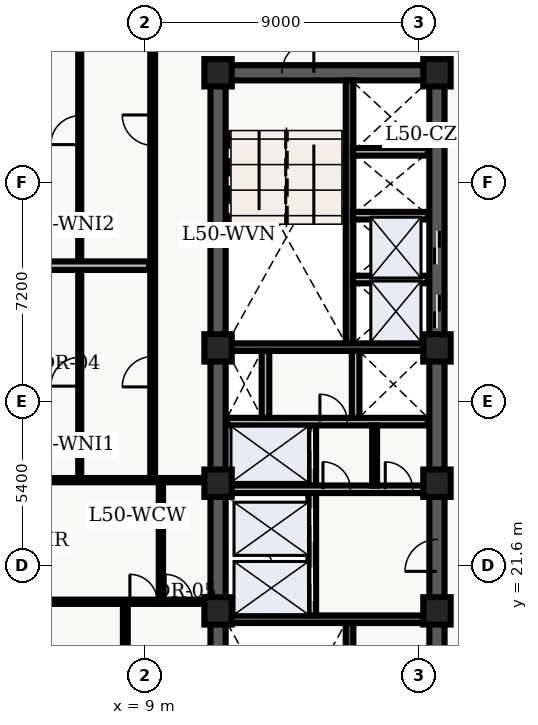
"""IFC4 building model, lengths in metres.
Left out: names, types, materials, properties, quantities, classifications, styles, units other than length and angle.
Written with IfcOpenShell. Run it as: python <this file> out.ifc"""

import sys

from ifc_helpers import new_model, entity, si_unit, converted_unit, direction, frame, origin_with_axes, origin_2d_with_axis, place, context, subcontext, project, spatial, polyline, rectangle, outline, extrude, element, fill, save


model = new_model("IFC4")
c1 = context("Model", 3, precision=1e-05, world=origin_with_axes(), true_north=direction((0.0, 1.0)))
c2 = subcontext(c1, "Body", "Model", "MODEL_VIEW")
j1 = project(units=[si_unit("LENGTHUNIT", "METRE"), converted_unit("PLANEANGLEUNIT", "DEGREE", entity("IfcPlaneAngleMeasure", 0.017), si_unit("PLANEANGLEUNIT", "RADIAN"), dimensions=[0, 0, 0, 0, 0, 0, 0])], contexts=[c1])
p1 = place(None, origin_with_axes())
s1 = spatial("IfcSite", under=j1, at=p1, CompositionType="ELEMENT")
p2 = place(p1, origin_with_axes())
s2 = spatial("IfcBuilding", under=s1, at=p2, CompositionType="ELEMENT")
p3 = place(p2, frame((0.0, 0.0, 204.3), z_axis=(0.0, 0.0, 1.0), x_axis=(1.0, 0.0, 0.0)))
s3 = spatial("IfcBuildingStorey", under=s2, at=p3, CompositionType="ELEMENT", Elevation=204.3)
p4 = place(p3, frame((11.4, 10.8, 0.0), z_axis=(0.0, 0.0, 1.0), x_axis=(0.0, 1.0, 0.0)))
e1 = element("IfcWall", 1, at=p4, inside=s3, PredefinedType="SHEAR", context=c2, shape_type="SweptSolid", body=[
    extrude(outline(polyline([(0.0, -0.25), (27.0, -0.25), (27.0, 0.25), (0.0, 0.25), (0.0, -0.25)])), origin_with_axes(), (0.0, 0.0, 1.0), 3.66),
])
p5 = place(p3, frame((11.4, 37.8, 0.0), z_axis=(0.0, 0.0, 1.0), x_axis=(1.0, 0.0, 0.0)))
e2 = element("IfcWall", 2, at=p5, inside=s3, PredefinedType="SHEAR", context=c2, shape_type="SweptSolid", body=[
    extrude(outline(polyline([(0.0, -0.25), (7.2, -0.25), (7.2, 0.25), (0.0, 0.25), (0.0, -0.25)])), origin_with_axes(), (0.0, 0.0, 1.0), 3.66),
])
p6 = place(p5, frame((2.625, 0.0, 0.0), z_axis=(0.0, 0.0, 1.0), x_axis=(1.0, 0.0, 0.0)))
e3 = element("IfcOpeningElement", 3, at=p6, cuts=e2, PredefinedType="OPENING", context=c2, shape_type="SweptSolid", body=[
    extrude(rectangle(XDim=1.05, YDim=0.52, at=origin_2d_with_axis()), origin_with_axes(), (0.0, 0.0, 1.0), 2.15),
])
p7 = place(p3, frame((18.6, 10.8, 0.0), z_axis=(0.0, 0.0, 1.0), x_axis=(0.0, 1.0, 0.0)))
e4 = element("IfcWall", 4, at=p7, inside=s3, PredefinedType="SHEAR", context=c2, shape_type="SweptSolid", body=[
    extrude(outline(polyline([(0.0, -0.25), (13.5, -0.25), (13.5, 0.25), (0.0, 0.25), (0.0, -0.25)])), origin_with_axes(), (0.0, 0.0, 1.0), 3.66),
])
p8 = place(p7, frame((11.125, 0.0, 0.0), z_axis=(0.0, 0.0, 1.0), x_axis=(1.0, 0.0, 0.0)))
e5 = element("IfcOpeningElement", 5, at=p8, cuts=e4, PredefinedType="OPENING", context=c2, shape_type="SweptSolid", body=[
    extrude(rectangle(XDim=1.05, YDim=0.52, at=origin_2d_with_axis()), origin_with_axes(), (0.0, 0.0, 1.0), 2.15),
])
p9 = place(p7, frame((2.425, 0.0, 0.0), z_axis=(0.0, 0.0, 1.0), x_axis=(1.0, 0.0, 0.0)))
e6 = element("IfcOpeningElement", 6, at=p9, cuts=e4, PredefinedType="OPENING", context=c2, shape_type="SweptSolid", body=[
    extrude(rectangle(XDim=1.05, YDim=0.52, at=origin_2d_with_axis()), origin_with_axes(), (0.0, 0.0, 1.0), 2.15),
])
p10 = place(p7, frame((6.725, 0.0, 0.0), z_axis=(0.0, 0.0, 1.0), x_axis=(1.0, 0.0, 0.0)))
e7 = element("IfcOpeningElement", 7, at=p10, cuts=e4, PredefinedType="OPENING", context=c2, shape_type="SweptSolid", body=[
    extrude(rectangle(XDim=1.05, YDim=0.52, at=origin_2d_with_axis()), origin_with_axes(), (0.0, 0.0, 1.0), 2.15),
])
p11 = place(p3, frame((18.6, 24.3, 0.0), z_axis=(0.0, 0.0, 1.0), x_axis=(0.0, 1.0, 0.0)))
e8 = element("IfcWall", 8, at=p11, inside=s3, PredefinedType="SHEAR", context=c2, shape_type="SweptSolid", body=[
    extrude(outline(polyline([(0.0, -0.25), (13.5, -0.25), (13.5, 0.25), (0.0, 0.25), (0.0, -0.25)])), origin_with_axes(), (0.0, 0.0, 1.0), 3.66),
])
p12 = place(p11, frame((5.65, 0.0, 0.0), z_axis=(0.0, 0.0, 1.0), x_axis=(1.0, 0.0, 0.0)))
e9 = element("IfcOpeningElement", 9, at=p12, cuts=e8, PredefinedType="OPENING", context=c2, shape_type="SweptSolid", body=[
    extrude(rectangle(XDim=1.1, YDim=0.52, at=origin_2d_with_axis()), origin_with_axes(), (0.0, 0.0, 1.0), 2.15),
])
p13 = place(p11, frame((7.75, 0.0, 0.0), z_axis=(0.0, 0.0, 1.0), x_axis=(1.0, 0.0, 0.0)))
e10 = element("IfcOpeningElement", 10, at=p13, cuts=e8, PredefinedType="OPENING", context=c2, shape_type="SweptSolid", body=[
    extrude(rectangle(XDim=1.1, YDim=0.52, at=origin_2d_with_axis()), origin_with_axes(), (0.0, 0.0, 1.0), 2.15),
])
p14 = place(p3, frame((15.725, 11.05, 0.0), z_axis=(0.0, 0.0, 1.0), x_axis=(0.0, 1.0, 0.0)))
e11 = element("IfcWall", 11, at=p14, inside=s3, PredefinedType="SHEAR", context=c2, shape_type="SweptSolid", body=[
    extrude(outline(polyline([(0.0, -0.125), (8.65, -0.125), (8.65, 0.125), (0.0, 0.125), (0.0, -0.125)])), origin_with_axes(), (0.0, 0.0, 1.0), 3.66),
])
p15 = place(p3, frame((11.65, 19.825, 0.0), z_axis=(0.0, 0.0, 1.0), x_axis=(1.0, 0.0, 0.0)))
e12 = element("IfcWall", 12, at=p15, inside=s3, PredefinedType="SHEAR", context=c2, shape_type="SweptSolid", body=[
    extrude(outline(polyline([(0.0, -0.125), (6.7, -0.125), (6.7, 0.125), (0.0, 0.125), (0.0, -0.125)])), origin_with_axes(), (0.0, 0.0, 1.0), 3.66),
])
p16 = place(p3, frame((15.725, 28.9, 0.0), z_axis=(0.0, 0.0, 1.0), x_axis=(0.0, 1.0, 0.0)))
e13 = element("IfcWall", 13, at=p16, inside=s3, PredefinedType="SHEAR", context=c2, shape_type="SweptSolid", body=[
    extrude(outline(polyline([(0.0, -0.125), (8.65, -0.125), (8.65, 0.125), (0.0, 0.125), (0.0, -0.125)])), origin_with_axes(), (0.0, 0.0, 1.0), 3.66),
])
p17 = place(p3, frame((11.65, 28.775, 0.0), z_axis=(0.0, 0.0, 1.0), x_axis=(1.0, 0.0, 0.0)))
e14 = element("IfcWall", 14, at=p17, inside=s3, PredefinedType="SHEAR", context=c2, shape_type="SweptSolid", body=[
    extrude(outline(polyline([(0.0, -0.125), (6.7, -0.125), (6.7, 0.125), (0.0, 0.125), (0.0, -0.125)])), origin_with_axes(), (0.0, 0.0, 1.0), 3.66),
])
p18 = place(p3, frame((14.5, 19.95, 0.0), z_axis=(0.0, 0.0, 1.0), x_axis=(0.0, 1.0, 0.0)))
e15 = element("IfcWall", 15, at=p18, inside=s3, PredefinedType="SOLIDWALL", context=c2, shape_type="SweptSolid", body=[
    extrude(outline(polyline([(0.0, -0.125), (6.25, -0.125), (6.25, 0.125), (0.0, 0.125), (0.0, -0.125)])), origin_with_axes(), (0.0, 0.0, 1.0), 2.7),
])
p19 = place(p18, frame((1.025, 0.0, 0.0), z_axis=(0.0, 0.0, 1.0), x_axis=(1.0, 0.0, 0.0)))
e16 = element("IfcOpeningElement", 16, at=p19, cuts=e15, PredefinedType="OPENING", context=c2, shape_type="SweptSolid", body=[
    extrude(rectangle(XDim=1.1, YDim=0.27, at=origin_2d_with_axis()), origin_with_axes(), (0.0, 0.0, 1.0), 2.15),
])
p20 = place(p18, frame((2.975, 0.0, 0.0), z_axis=(0.0, 0.0, 1.0), x_axis=(1.0, 0.0, 0.0)))
e17 = element("IfcOpeningElement", 17, at=p20, cuts=e15, PredefinedType="OPENING", context=c2, shape_type="SweptSolid", body=[
    extrude(rectangle(XDim=1.1, YDim=0.27, at=origin_2d_with_axis()), origin_with_axes(), (0.0, 0.0, 1.0), 2.15),
])
p21 = place(p18, frame((5.425, 0.0, 0.0), z_axis=(0.0, 0.0, 1.0), x_axis=(1.0, 0.0, 0.0)))
e18 = element("IfcOpeningElement", 18, at=p21, cuts=e15, PredefinedType="OPENING", context=c2, shape_type="SweptSolid", body=[
    extrude(rectangle(XDim=1.2, YDim=0.27, at=origin_2d_with_axis()), origin_with_axes(), (0.0, 0.0, 1.0), 2.15),
])
p22 = place(p3, frame((11.7, 24.1, 0.0), z_axis=(0.0, 0.0, 1.0), x_axis=(1.0, 0.0, 0.0)))
e19 = element("IfcWall", 19, at=p22, inside=s3, PredefinedType="SOLIDWALL", context=c2, shape_type="SweptSolid", body=[
    extrude(outline(polyline([(0.0, -0.125), (6.6, -0.125), (6.6, 0.125), (0.0, 0.125), (0.0, -0.125)])), origin_with_axes(), (0.0, 0.0, 1.0), 2.7),
])
p23 = place(p22, frame((3.6, 0.0, 0.0), z_axis=(0.0, 0.0, 1.0), x_axis=(1.0, 0.0, 0.0)))
e20 = element("IfcOpeningElement", 20, at=p23, cuts=e19, PredefinedType="OPENING", context=c2, shape_type="SweptSolid", body=[
    extrude(rectangle(XDim=0.9, YDim=0.27, at=origin_2d_with_axis()), origin_with_axes(), (0.0, 0.0, 1.0), 2.15),
])
p24 = place(p22, frame((5.65, 0.0, 0.0), z_axis=(0.0, 0.0, 1.0), x_axis=(1.0, 0.0, 0.0)))
e21 = element("IfcOpeningElement", 21, at=p24, cuts=e19, PredefinedType="OPENING", context=c2, shape_type="SweptSolid", body=[
    extrude(rectangle(XDim=0.9, YDim=0.27, at=origin_2d_with_axis()), origin_with_axes(), (0.0, 0.0, 1.0), 2.15),
])
p25 = place(p3, frame((11.7, 26.325, 0.0), z_axis=(0.0, 0.0, 1.0), x_axis=(1.0, 0.0, 0.0)))
e22 = element("IfcWall", 22, at=p25, inside=s3, PredefinedType="SOLIDWALL", context=c2, shape_type="SweptSolid", body=[
    extrude(outline(polyline([(0.0, -0.125), (6.6, -0.125), (6.6, 0.125), (0.0, 0.125), (0.0, -0.125)])), origin_with_axes(), (0.0, 0.0, 1.0), 2.7),
])
p26 = place(p25, frame((3.5, 0.0, 0.0), z_axis=(0.0, 0.0, 1.0), x_axis=(1.0, 0.0, 0.0)))
e23 = element("IfcOpeningElement", 23, at=p26, cuts=e22, PredefinedType="OPENING", context=c2, shape_type="SweptSolid", body=[
    extrude(rectangle(XDim=0.9, YDim=0.27, at=origin_2d_with_axis()), origin_with_axes(), (0.0, 0.0, 1.0), 2.15),
])
for number, where, z_axis, x_axis in (
    (24, (12.96, 26.45, 0.0), (0.0, 0.0, 1.0), (0.0, 1.0, 0.0)),
    (25, (15.925, 26.45, 0.0), (0.0, 0.0, 1.0), (0.0, 1.0, 0.0)),
):
    element("IfcWall", number, at=place(p3, frame(where, z_axis=z_axis, x_axis=x_axis)), inside=s3, PredefinedType="SOLIDWALL", context=c2, shape_type="SweptSolid", body=[
        extrude(outline(polyline([(0.0, -0.125), (2.2, -0.125), (2.2, 0.125), (0.0, 0.125), (0.0, -0.125)])), origin_with_axes(), (0.0, 0.0, 1.0), 2.7),
    ])
for number, where, z_axis, x_axis in (
    (26, (11.4, 20.1, 0.0), (0.0, 0.0, 1.0), (1.0, 0.0, 0.0)),
    (27, (11.4, 24.3, 0.0), (0.0, 0.0, 1.0), (1.0, 0.0, 0.0)),
    (28, (11.4, 28.75, 0.0), (0.0, 0.0, 1.0), (1.0, 0.0, 0.0)),
    (29, (11.4, 37.8, 0.0), (0.0, 0.0, 1.0), (1.0, 0.0, 0.0)),
    (30, (18.6, 20.1, 0.0), (0.0, 0.0, 1.0), (1.0, 0.0, 0.0)),
    (31, (18.6, 24.3, 0.0), (0.0, 0.0, 1.0), (1.0, 0.0, 0.0)),
    (32, (18.6, 28.75, 0.0), (0.0, 0.0, 1.0), (1.0, 0.0, 0.0)),
    (33, (18.6, 37.8, 0.0), (0.0, 0.0, 1.0), (1.0, 0.0, 0.0)),
):
    element("IfcColumn", number, at=place(p3, frame(where, z_axis=z_axis, x_axis=x_axis)), inside=s3, PredefinedType="COLUMN", context=c2, shape_type="SweptSolid", body=[
        extrude(rectangle(XDim=0.9, YDim=0.9, at=origin_2d_with_axis()), origin_with_axes(), (0.0, 0.0, 1.0), 3.9),
    ])
p27 = place(p3, frame((16.55, 24.22, 0.0), z_axis=(0.0, 0.0, 1.0), x_axis=(0.0, 1.0, 0.0)))
e34 = element("IfcWall", 34, at=p27, inside=s3, PredefinedType="PARTITIONING", context=c2, shape_type="SweptSolid", body=[
    extrude(outline(polyline([(0.0, -0.08), (1.98, -0.08), (1.98, 0.08), (0.0, 0.08), (0.0, -0.08)])), origin_with_axes(), (0.0, 0.0, 1.0), 2.7),
])
for number, where, z_axis, x_axis in (
    (35, (15.84, 31.0, 0.0), (0.0, 0.0, 1.0), (1.0, 0.0, 0.0)),
    (36, (15.84, 33.1, 0.0), (0.0, 0.0, 1.0), (1.0, 0.0, 0.0)),
    (37, (15.84, 35.2, 0.0), (0.0, 0.0, 1.0), (1.0, 0.0, 0.0)),
):
    element("IfcWall", number, at=place(p3, frame(where, z_axis=z_axis, x_axis=x_axis)), inside=s3, PredefinedType="SOLIDWALL", context=c2, shape_type="SweptSolid", body=[
        extrude(outline(polyline([(0.0, -0.125), (2.46, -0.125), (2.46, 0.125), (0.0, 0.125), (0.0, -0.125)])), origin_with_axes(), (0.0, 0.0, 1.0), 2.7),
    ])
p28 = place(p3, frame((9.52, 20.4, 0.0), z_axis=(0.0, 0.0, 1.0), x_axis=(0.0, 1.0, 0.0)))
e38 = element("IfcWall", 38, at=p28, inside=s3, PredefinedType="PARTITIONING", context=c2, shape_type="SweptSolid", body=[
    extrude(outline(polyline([(0.0, -0.07), (4.0, -0.07), (4.0, 0.07), (0.0, 0.07), (0.0, -0.07)])), origin_with_axes(), (0.0, 0.0, 1.0), 2.7),
])
p29 = place(p3, frame((9.52, 20.4, 0.0), z_axis=(0.0, 0.0, 1.0), x_axis=(1.0, 0.0, 0.0)))
e39 = element("IfcWall", 39, at=p29, inside=s3, PredefinedType="PARTITIONING", context=c2, shape_type="SweptSolid", body=[
    extrude(outline(polyline([(0.0, -0.07), (1.58, -0.07), (1.58, 0.07), (0.0, 0.07), (0.0, -0.07)])), origin_with_axes(), (0.0, 0.0, 1.0), 2.7),
])
p30 = place(p29, frame((0.59, 0.0, 0.0), z_axis=(0.0, 0.0, 1.0), x_axis=(1.0, 0.0, 0.0)))
e40 = element("IfcOpeningElement", 40, at=p30, cuts=e39, PredefinedType="OPENING", context=c2, shape_type="SweptSolid", body=[
    extrude(rectangle(XDim=0.9, YDim=0.16, at=origin_2d_with_axis()), origin_with_axes(), (0.0, 0.0, 1.0), 2.15),
])
p31 = place(p3, frame((9.52, 24.4, 0.0), z_axis=(0.0, 0.0, 1.0), x_axis=(1.0, 0.0, 0.0)))
e41 = element("IfcWall", 41, at=p31, inside=s3, PredefinedType="PARTITIONING", context=c2, shape_type="SweptSolid", body=[
    extrude(outline(polyline([(0.0, -0.07), (1.58, -0.07), (1.58, 0.07), (0.0, 0.07), (0.0, -0.07)])), origin_with_axes(), (0.0, 0.0, 1.0), 2.7),
])
p32 = place(p3, frame((8.35, 7.8, 0.0), z_axis=(0.0, 0.0, 1.0), x_axis=(0.0, 1.0, 0.0)))
e42 = element("IfcWall", 42, at=p32, inside=s3, PredefinedType="PARTITIONING", context=c2, shape_type="SweptSolid", body=[
    extrude(outline(polyline([(0.0, -0.08), (12.6, -0.08), (12.6, 0.08), (0.0, 0.08), (0.0, -0.08)])), origin_with_axes(), (0.0, 0.0, 1.0), 2.7),
])
p33 = place(p32, frame((2.893, 0.0, 0.0), z_axis=(0.0, 0.0, 1.0), x_axis=(1.0, 0.0, 0.0)))
e43 = element("IfcOpeningElement", 43, at=p33, cuts=e42, PredefinedType="OPENING", context=c2, shape_type="SweptSolid", body=[
    extrude(rectangle(XDim=1.0, YDim=0.18, at=origin_2d_with_axis()), origin_with_axes(), (0.0, 0.0, 1.0), 2.15),
])
p34 = place(p32, frame((9.088, 0.0, 0.0), z_axis=(0.0, 0.0, 1.0), x_axis=(1.0, 0.0, 0.0)))
e44 = element("IfcOpeningElement", 44, at=p34, cuts=e42, PredefinedType="OPENING", context=c2, shape_type="SweptSolid", body=[
    extrude(rectangle(XDim=1.0, YDim=0.18, at=origin_2d_with_axis()), origin_with_axes(), (0.0, 0.0, 1.0), 2.15),
])
p35 = place(p3, frame((9.25, 24.4, 0.0), z_axis=(0.0, 0.0, 1.0), x_axis=(0.0, 1.0, 0.0)))
e45 = element("IfcWall", 45, at=p35, inside=s3, PredefinedType="PARTITIONING", context=c2, shape_type="SweptSolid", body=[
    extrude(outline(polyline([(0.0, -0.08), (16.1, -0.08), (16.1, 0.08), (0.0, 0.08), (0.0, -0.08)])), origin_with_axes(), (0.0, 0.0, 1.0), 2.7),
])
p36 = place(p35, frame((3.567, 0.0, 0.0), z_axis=(0.0, 0.0, 1.0), x_axis=(1.0, 0.0, 0.0)))
e46 = element("IfcOpeningElement", 46, at=p36, cuts=e45, PredefinedType="OPENING", context=c2, shape_type="SweptSolid", body=[
    extrude(rectangle(XDim=1.0, YDim=0.18, at=origin_2d_with_axis()), origin_with_axes(), (0.0, 0.0, 1.0), 2.15),
])
p37 = place(p35, frame((11.512, 0.0, 0.0), z_axis=(0.0, 0.0, 1.0), x_axis=(1.0, 0.0, 0.0)))
e47 = element("IfcOpeningElement", 47, at=p37, cuts=e45, PredefinedType="OPENING", context=c2, shape_type="SweptSolid", body=[
    extrude(rectangle(XDim=1.0, YDim=0.18, at=origin_2d_with_axis()), origin_with_axes(), (0.0, 0.0, 1.0), 2.15),
])
p38 = place(p3, frame((0.335, 20.4, 0.0), z_axis=(0.0, 0.0, 1.0), x_axis=(1.0, 0.0, 0.0)))
e48 = element("IfcWall", 48, at=p38, inside=s3, PredefinedType="PARTITIONING", context=c2, shape_type="SweptSolid", body=[
    extrude(outline(polyline([(0.0, -0.07), (9.185, -0.07), (9.185, 0.07), (0.0, 0.07), (0.0, -0.07)])), origin_with_axes(), (0.0, 0.0, 1.0), 2.7),
])
p39 = place(p38, frame((8.615, 0.0, 0.0), z_axis=(0.0, 0.0, 1.0), x_axis=(1.0, 0.0, 0.0)))
e49 = element("IfcOpeningElement", 49, at=p39, cuts=e48, PredefinedType="OPENING", context=c2, shape_type="SweptSolid", body=[
    extrude(rectangle(XDim=0.9, YDim=0.16, at=origin_2d_with_axis()), origin_with_axes(), (0.0, 0.0, 1.0), 2.15),
])
p40 = place(p3, frame((0.335, 24.4, 0.0), z_axis=(0.0, 0.0, 1.0), x_axis=(1.0, 0.0, 0.0)))
e50 = element("IfcWall", 50, at=p40, inside=s3, PredefinedType="PARTITIONING", context=c2, shape_type="SweptSolid", body=[
    extrude(outline(polyline([(0.0, -0.07), (9.185, -0.07), (9.185, 0.07), (0.0, 0.07), (0.0, -0.07)])), origin_with_axes(), (0.0, 0.0, 1.0), 2.7),
])
p41 = place(p3, frame((6.85, 24.55, 0.0), z_axis=(0.0, 0.0, 1.0), x_axis=(0.0, 1.0, 0.0)))
e51 = element("IfcWall", 51, at=p41, inside=s3, PredefinedType="PARTITIONING", context=c2, shape_type="SweptSolid", body=[
    extrude(outline(polyline([(0.0, -0.05), (15.75, -0.05), (15.75, 0.05), (0.0, 0.05), (0.0, -0.05)])), origin_with_axes(), (0.0, 0.0, 1.0), 2.7),
])
p42 = place(p41, frame((3.417, 0.0, 0.0), z_axis=(0.0, 0.0, 1.0), x_axis=(1.0, 0.0, 0.0)))
e52 = element("IfcOpeningElement", 52, at=p42, cuts=e51, PredefinedType="OPENING", context=c2, shape_type="SweptSolid", body=[
    extrude(rectangle(XDim=0.95, YDim=0.12, at=origin_2d_with_axis()), origin_with_axes(), (0.0, 0.0, 1.0), 2.15),
])
p43 = place(p41, frame((11.363, 0.0, 0.0), z_axis=(0.0, 0.0, 1.0), x_axis=(1.0, 0.0, 0.0)))
e53 = element("IfcOpeningElement", 53, at=p43, cuts=e51, PredefinedType="OPENING", context=c2, shape_type="SweptSolid", body=[
    extrude(rectangle(XDim=0.95, YDim=0.12, at=origin_2d_with_axis()), origin_with_axes(), (0.0, 0.0, 1.0), 2.15),
])
p44 = place(p3, frame((0.335, 31.455, 0.0), z_axis=(0.0, 0.0, 1.0), x_axis=(1.0, 0.0, 0.0)))
e54 = element("IfcWall", 54, at=p44, inside=s3, PredefinedType="PARTITIONING", context=c2, shape_type="SweptSolid", body=[
    extrude(outline(polyline([(0.0, -0.14), (8.795, -0.14), (8.795, 0.14), (0.0, 0.14), (0.0, -0.14)])), origin_with_axes(), (0.0, 0.0, 1.0), 2.7),
])
p45 = place(p11, frame((5.65, 0.0, 0.0), z_axis=(0.0, 0.0, 1.0), x_axis=(1.0, 0.0, 0.0)))
e55 = element("IfcDoor", 55, at=p45, inside=s3, OperationType="SLIDING_TO_LEFT", PredefinedType="DOOR", context=c2, shape_type="SweptSolid", body=[
    extrude(rectangle(XDim=1.1, YDim=0.09, at=origin_2d_with_axis()), origin_with_axes(), (0.0, 0.0, 1.0), 2.15),
])
fill(e9, e55)
p46 = place(p11, frame((7.75, 0.0, 0.0), z_axis=(0.0, 0.0, 1.0), x_axis=(1.0, 0.0, 0.0)))
e56 = element("IfcDoor", 56, at=p46, inside=s3, OperationType="SLIDING_TO_RIGHT", PredefinedType="DOOR", context=c2, shape_type="SweptSolid", body=[
    extrude(rectangle(XDim=1.1, YDim=0.09, at=origin_2d_with_axis()), origin_with_axes(), (0.0, 0.0, 1.0), 2.15),
])
fill(e10, e56)
p47 = place(p18, frame((1.025, 0.0, 0.0), z_axis=(0.0, 0.0, 1.0), x_axis=(1.0, 0.0, 0.0)))
e57 = element("IfcDoor", 57, at=p47, inside=s3, OperationType="SLIDING_TO_LEFT", PredefinedType="DOOR", context=c2, shape_type="SweptSolid", body=[
    extrude(rectangle(XDim=1.1, YDim=0.09, at=origin_2d_with_axis()), origin_with_axes(), (0.0, 0.0, 1.0), 2.15),
])
fill(e16, e57)
p48 = place(p18, frame((2.975, 0.0, 0.0), z_axis=(0.0, 0.0, 1.0), x_axis=(1.0, 0.0, 0.0)))
e58 = element("IfcDoor", 58, at=p48, inside=s3, OperationType="SLIDING_TO_RIGHT", PredefinedType="DOOR", context=c2, shape_type="SweptSolid", body=[
    extrude(rectangle(XDim=1.1, YDim=0.09, at=origin_2d_with_axis()), origin_with_axes(), (0.0, 0.0, 1.0), 2.15),
])
fill(e17, e58)
p49 = place(p18, frame((5.425, 0.0, 0.0), z_axis=(0.0, 0.0, 1.0), x_axis=(1.0, 0.0, 0.0)))
e59 = element("IfcDoor", 59, at=p49, inside=s3, OperationType="DOUBLE_DOOR_SLIDING", PredefinedType="DOOR", context=c2, shape_type="SweptSolid", body=[
    extrude(rectangle(XDim=1.2, YDim=0.09, at=origin_2d_with_axis()), origin_with_axes(), (0.0, 0.0, 1.0), 2.15),
])
fill(e18, e59)
p50 = place(p5, frame((2.625, 0.0, 0.0), z_axis=(0.0, 0.0, 1.0), x_axis=(1.0, 0.0, 0.0)))
e60 = element("IfcDoor", 60, at=p50, inside=s3, OperationType="SINGLE_SWING_RIGHT", PredefinedType="DOOR", context=c2, shape_type="SweptSolid", body=[
    extrude(rectangle(XDim=1.05, YDim=0.09, at=origin_2d_with_axis()), origin_with_axes(), (0.0, 0.0, 1.0), 2.15),
])
fill(e3, e60)
p51 = place(p7, frame((11.125, 0.0, 0.0), z_axis=(0.0, 0.0, 1.0), x_axis=(1.0, 0.0, 0.0)))
e61 = element("IfcDoor", 61, at=p51, inside=s3, OperationType="SINGLE_SWING_LEFT", PredefinedType="DOOR", context=c2, shape_type="SweptSolid", body=[
    extrude(rectangle(XDim=1.05, YDim=0.09, at=origin_2d_with_axis()), origin_with_axes(), (0.0, 0.0, 1.0), 2.15),
])
fill(e5, e61)
p52 = place(p22, frame((3.6, 0.0, 0.0), z_axis=(0.0, 0.0, 1.0), x_axis=(1.0, 0.0, 0.0)))
e62 = element("IfcDoor", 62, at=p52, inside=s3, OperationType="SINGLE_SWING_LEFT", PredefinedType="DOOR", context=c2, shape_type="SweptSolid", body=[
    extrude(rectangle(XDim=0.9, YDim=0.09, at=origin_2d_with_axis()), origin_with_axes(), (0.0, 0.0, 1.0), 2.15),
])
fill(e20, e62)
p53 = place(p22, frame((5.65, 0.0, 0.0), z_axis=(0.0, 0.0, 1.0), x_axis=(1.0, 0.0, 0.0)))
e63 = element("IfcDoor", 63, at=p53, inside=s3, OperationType="SINGLE_SWING_LEFT", PredefinedType="DOOR", context=c2, shape_type="SweptSolid", body=[
    extrude(rectangle(XDim=0.9, YDim=0.09, at=origin_2d_with_axis()), origin_with_axes(), (0.0, 0.0, 1.0), 2.15),
])
fill(e21, e63)
p54 = place(p25, frame((3.5, 0.0, 0.0), z_axis=(0.0, 0.0, 1.0), x_axis=(1.0, 0.0, 0.0)))
e64 = element("IfcDoor", 64, at=p54, inside=s3, OperationType="SINGLE_SWING_LEFT", PredefinedType="DOOR", context=c2, shape_type="SweptSolid", body=[
    extrude(rectangle(XDim=0.9, YDim=0.09, at=origin_2d_with_axis()), origin_with_axes(), (0.0, 0.0, 1.0), 2.15),
])
fill(e23, e64)
p55 = place(p29, frame((0.59, 0.0, 0.0), z_axis=(0.0, 0.0, 1.0), x_axis=(1.0, 0.0, 0.0)))
e65 = element("IfcDoor", 65, at=p55, inside=s3, OperationType="SINGLE_SWING_LEFT", PredefinedType="DOOR", context=c2, shape_type="SweptSolid", body=[
    extrude(rectangle(XDim=0.9, YDim=0.084, at=origin_2d_with_axis()), origin_with_axes(), (0.0, 0.0, 1.0), 2.15),
])
fill(e40, e65)
p56 = place(p38, frame((8.615, 0.0, 0.0), z_axis=(0.0, 0.0, 1.0), x_axis=(1.0, 0.0, 0.0)))
e66 = element("IfcDoor", 66, at=p56, inside=s3, OperationType="SINGLE_SWING_LEFT", PredefinedType="DOOR", context=c2, shape_type="SweptSolid", body=[
    extrude(rectangle(XDim=0.9, YDim=0.084, at=origin_2d_with_axis()), origin_with_axes(), (0.0, 0.0, 1.0), 2.15),
])
fill(e49, e66)
p57 = place(p41, frame((3.417, 0.0, 0.0), z_axis=(0.0, 0.0, 1.0), x_axis=(1.0, 0.0, 0.0)))
e67 = element("IfcDoor", 67, at=p57, inside=s3, OperationType="SINGLE_SWING_LEFT", PredefinedType="DOOR", context=c2, shape_type="SweptSolid", body=[
    extrude(rectangle(XDim=0.95, YDim=0.06, at=origin_2d_with_axis()), origin_with_axes(), (0.0, 0.0, 1.0), 2.15),
])
fill(e52, e67)
p58 = place(p35, frame((3.567, 0.0, 0.0), z_axis=(0.0, 0.0, 1.0), x_axis=(1.0, 0.0, 0.0)))
e68 = element("IfcDoor", 68, at=p58, inside=s3, OperationType="SINGLE_SWING_LEFT", PredefinedType="DOOR", context=c2, shape_type="SweptSolid", body=[
    extrude(rectangle(XDim=1.0, YDim=0.09, at=origin_2d_with_axis()), origin_with_axes(), (0.0, 0.0, 1.0), 2.15),
])
fill(e46, e68)
p59 = place(p41, frame((11.363, 0.0, 0.0), z_axis=(0.0, 0.0, 1.0), x_axis=(1.0, 0.0, 0.0)))
e69 = element("IfcDoor", 69, at=p59, inside=s3, OperationType="SINGLE_SWING_LEFT", PredefinedType="DOOR", context=c2, shape_type="SweptSolid", body=[
    extrude(rectangle(XDim=0.95, YDim=0.06, at=origin_2d_with_axis()), origin_with_axes(), (0.0, 0.0, 1.0), 2.15),
])
fill(e53, e69)
p60 = place(p35, frame((11.512, 0.0, 0.0), z_axis=(0.0, 0.0, 1.0), x_axis=(1.0, 0.0, 0.0)))
e70 = element("IfcDoor", 70, at=p60, inside=s3, OperationType="SINGLE_SWING_RIGHT", PredefinedType="DOOR", context=c2, shape_type="SweptSolid", body=[
    extrude(rectangle(XDim=1.0, YDim=0.09, at=origin_2d_with_axis()), origin_with_axes(), (0.0, 0.0, 1.0), 2.15),
])
fill(e47, e70)
save(model, sys.argv[1])
